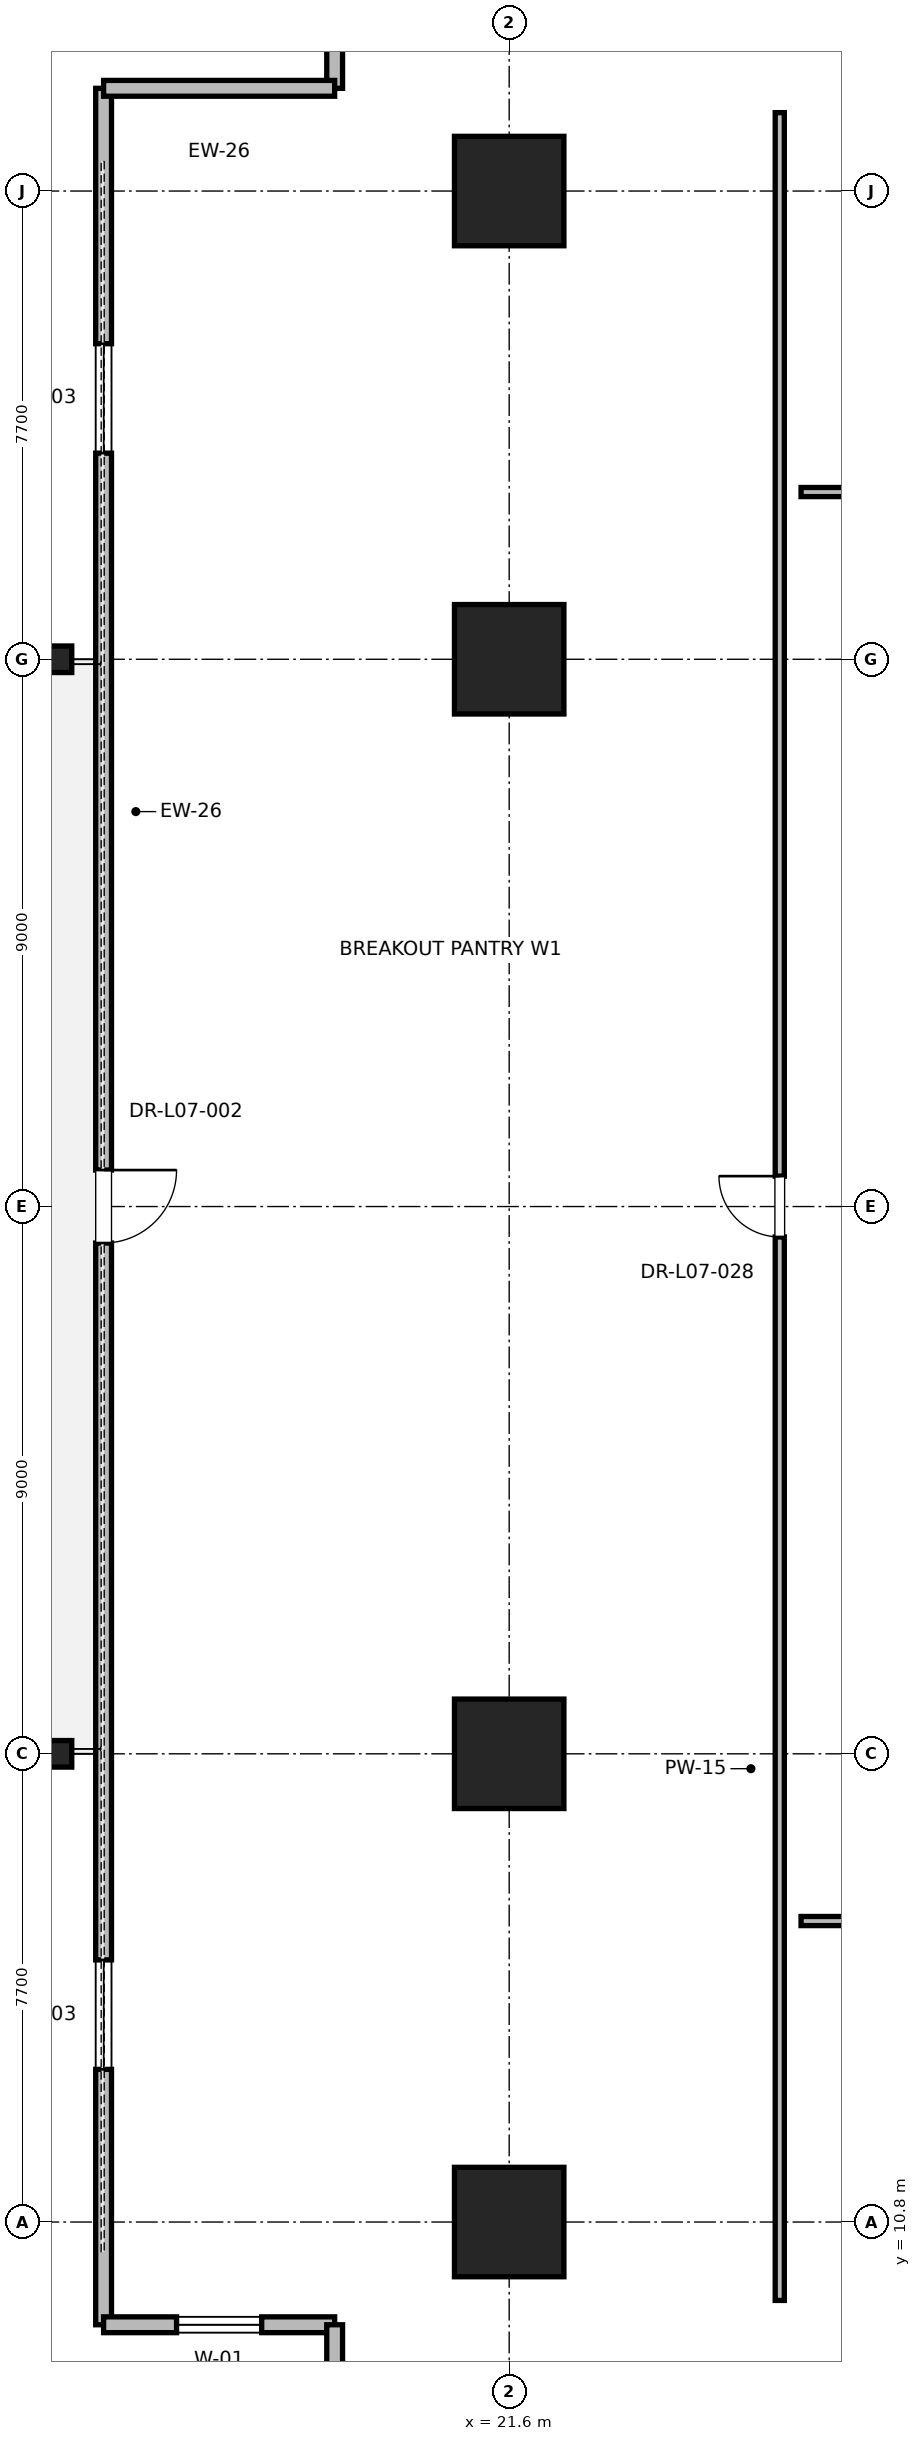
"""IFC4 building model, lengths in metres.
Left out: names, types, materials, properties, quantities, classifications, styles, units other than length and angle.
Written with IfcOpenShell. Run it as: python <this file> out.ifc"""

import sys

from ifc_helpers import new_model, si_unit, direction, frame, frame_2d, origin, origin_2d, place, context, subcontext, project, spatial, rectangle, i_section, extrude, element, fill, save


model = new_model("IFC4")
c1 = context("Model", 3, precision=1e-05, world=origin(), true_north=direction((0.0, 1.0)))
c2 = subcontext(c1, "Body", "Model", "MODEL_VIEW")
j1 = project(units=[si_unit("LENGTHUNIT", "METRE"), si_unit("PLANEANGLEUNIT", "RADIAN")], contexts=[c1])
p1 = place(None, origin())
s1 = spatial("IfcSite", under=j1, at=p1, CompositionType="ELEMENT")
p2 = place(p1, origin())
s2 = spatial("IfcBuilding", under=s1, at=p2, CompositionType="ELEMENT")
p3 = place(p2, frame((0.0, 0.0, 35.6)))
s3 = spatial("IfcBuildingStorey", under=s2, at=p3, CompositionType="ELEMENT", Elevation=35.6)
for number, where, z_axis, x_axis in (
    (1, (21.6, 18.5, 0.0), (0.0, 0.0, 1.0), (1.0, 0.0, 0.0)),
    (2, (21.6, 36.5, 0.0), (0.0, 0.0, 1.0), (1.0, 0.0, 0.0)),
    (3, (21.6, 10.8, 0.0), (0.0, 0.0, 1.0), (1.0, 0.0, 0.0)),
    (4, (21.6, 44.2, 0.0), (0.0, 0.0, 1.0), (1.0, 0.0, 0.0)),
):
    element("IfcColumn", number, at=place(p3, frame(where, z_axis=z_axis, x_axis=x_axis)), inside=s3, PredefinedType="COLUMN", context=c2, shape_type="SweptSolid", body=[
        extrude(rectangle(XDim=1.8, YDim=1.8, at=origin_2d()), origin(), (0.0, 0.0, 1.0), 4.0),
    ])
for number, where, z_axis, x_axis in (
    (5, (14.2, 18.5, 0.0), (0.0, 0.0, 1.0), (1.0, 0.0, 0.0)),
    (6, (14.2, 36.5, 0.0), (0.0, 0.0, 1.0), (1.0, 0.0, 0.0)),
):
    element("IfcColumn", number, at=place(p3, frame(where, z_axis=z_axis, x_axis=x_axis)), inside=s3, PredefinedType="COLUMN", context=c2, shape_type="SweptSolid", body=[
        extrude(i_section(OverallWidth=0.412, OverallDepth=0.437, WebThickness=0.036, FlangeThickness=0.058, FilletRadius=0.015, at=origin_2d()), origin(), (0.0, 0.0, 1.0), 4.0),
    ])
p4 = place(p3, frame((14.93, 45.889, 0.0), z_axis=(0.0, 0.0, 1.0), x_axis=(0.0, -1.0, 0.0)))
e7 = element("IfcWall", 7, at=p4, inside=s3, PredefinedType="PARAPET", context=c2, shape_type="SweptSolid", body=[
    extrude(rectangle(XDim=36.779, YDim=0.26, at=frame_2d((18.389, 0.0))), origin(), (0.0, 0.0, 1.0), 2.889),
])
p5 = place(p4, frame((4.2, 0.0, 0.85)))
e8 = element("IfcOpeningElement", 8, at=p5, cuts=e7, PredefinedType="OPENING", context=c2, shape_type="SweptSolid", body=[
    extrude(rectangle(XDim=1.8, YDim=2.2, at=frame_2d((0.9, 1.1))), frame((0.0, 0.13, 0.0), z_axis=(0.0, -1.0, 0.0), x_axis=(1.0, 0.0, 0.0)), (0.0, 0.0, 1.0), 0.26),
])
p6 = place(p4, frame((17.789, 0.0, 0.0)))
e9 = element("IfcOpeningElement", 9, at=p6, cuts=e7, PredefinedType="OPENING", context=c2, shape_type="SweptSolid", body=[
    extrude(rectangle(XDim=1.2, YDim=2.2, at=frame_2d((0.6, 1.1))), frame((0.0, 0.13, 0.0), z_axis=(0.0, -1.0, 0.0), x_axis=(1.0, 0.0, 0.0)), (0.0, 0.0, 1.0), 0.26),
])
p7 = place(p4, frame((30.779, 0.0, 0.85)))
e10 = element("IfcOpeningElement", 10, at=p7, cuts=e7, PredefinedType="OPENING", context=c2, shape_type="SweptSolid", body=[
    extrude(rectangle(XDim=1.8, YDim=2.2, at=frame_2d((0.9, 1.1))), frame((0.0, 0.13, 0.0), z_axis=(0.0, -1.0, 0.0), x_axis=(1.0, 0.0, 0.0)), (0.0, 0.0, 1.0), 0.26),
])
p8 = place(p3, frame((14.93, 9.111, 0.0), z_axis=(0.0, 0.0, 1.0), x_axis=(1.0, 0.0, 0.0)))
e11 = element("IfcWall", 11, at=p8, inside=s3, PredefinedType="PARAPET", context=c2, shape_type="SweptSolid", body=[
    extrude(rectangle(XDim=3.8, YDim=0.26, at=frame_2d((1.9, 0.0))), origin(), (0.0, 0.0, 1.0), 3.76),
])
p9 = place(p8, frame((1.2, 0.0, 0.85)))
e12 = element("IfcOpeningElement", 12, at=p9, cuts=e11, PredefinedType="OPENING", context=c2, shape_type="SweptSolid", body=[
    extrude(rectangle(XDim=1.4, YDim=2.0, at=frame_2d((0.7, 1.0))), frame((0.0, 0.13, 0.0), z_axis=(0.0, -1.0, 0.0), x_axis=(1.0, 0.0, 0.0)), (0.0, 0.0, 1.0), 0.26),
])
p10 = place(p3, frame((18.729, 9.111, 0.0), z_axis=(0.0, 0.0, 1.0), x_axis=(0.0, -1.0, 0.0)))
e13 = element("IfcWall", 13, at=p10, inside=s3, PredefinedType="PARAPET", context=c2, shape_type="SweptSolid", body=[
    extrude(rectangle(XDim=3.4, YDim=0.26, at=frame_2d((1.7, 0.0))), origin(), (0.0, 0.0, 1.0), 3.76),
])
p11 = place(p3, frame((18.729, 49.289, 0.0), z_axis=(0.0, 0.0, 1.0), x_axis=(0.0, -1.0, 0.0)))
e14 = element("IfcWall", 14, at=p11, inside=s3, PredefinedType="PARAPET", context=c2, shape_type="SweptSolid", body=[
    extrude(rectangle(XDim=3.4, YDim=0.26, at=frame_2d((1.7, 0.0))), origin(), (0.0, 0.0, 1.0), 3.76),
])
p12 = place(p11, frame((1.0, 0.0, 0.85)))
e15 = element("IfcOpeningElement", 15, at=p12, cuts=e14, PredefinedType="OPENING", context=c2, shape_type="SweptSolid", body=[
    extrude(rectangle(XDim=1.4, YDim=2.0, at=frame_2d((0.7, 1.0))), frame((0.0, 0.13, 0.0), z_axis=(0.0, -1.0, 0.0), x_axis=(1.0, 0.0, 0.0)), (0.0, 0.0, 1.0), 0.26),
])
p13 = place(p3, frame((18.729, 45.889, 0.0), z_axis=(0.0, 0.0, 1.0), x_axis=(-1.0, 0.0, 0.0)))
e16 = element("IfcWall", 16, at=p13, inside=s3, PredefinedType="PARAPET", context=c2, shape_type="SweptSolid", body=[
    extrude(rectangle(XDim=3.8, YDim=0.26, at=frame_2d((1.9, 0.0))), origin(), (0.0, 0.0, 1.0), 3.76),
])
p14 = place(p3, frame((26.4, 39.25, 0.0), z_axis=(0.0, 0.0, 1.0), x_axis=(1.0, 0.0, 0.0)))
e17 = element("IfcWall", 17, at=p14, inside=s3, PredefinedType="PARTITIONING", context=c2, shape_type="SweptSolid", body=[
    extrude(rectangle(XDim=12.512, YDim=0.15, at=frame_2d((6.256, 0.0))), origin(), (0.0, 0.0, 1.0), 2.85),
])
p15 = place(p14, frame((5.771, 0.0, 0.0)))
e18 = element("IfcOpeningElement", 18, at=p15, cuts=e17, PredefinedType="OPENING", context=c2, shape_type="SweptSolid", body=[
    extrude(rectangle(XDim=1.0, YDim=2.15, at=frame_2d((0.5, 1.075))), frame((0.0, 0.075, 0.0), z_axis=(0.0, -1.0, 0.0), x_axis=(1.0, 0.0, 0.0)), (0.0, 0.0, 1.0), 0.15),
])
p16 = place(p3, frame((26.4, 15.75, 0.0), z_axis=(0.0, 0.0, 1.0), x_axis=(1.0, 0.0, 0.0)))
e19 = element("IfcWall", 19, at=p16, inside=s3, PredefinedType="PARTITIONING", context=c2, shape_type="SweptSolid", body=[
    extrude(rectangle(XDim=8.704, YDim=0.15, at=frame_2d((4.352, 0.0))), origin(), (0.0, 0.0, 1.0), 2.85),
])
p17 = place(p16, frame((3.617, 0.0, 0.0)))
e20 = element("IfcOpeningElement", 20, at=p17, cuts=e19, PredefinedType="OPENING", context=c2, shape_type="SweptSolid", body=[
    extrude(rectangle(XDim=1.5, YDim=2.25, at=frame_2d((0.75, 1.125))), frame((0.0, 0.075, 0.0), z_axis=(0.0, -1.0, 0.0), x_axis=(1.0, 0.0, 0.0)), (0.0, 0.0, 1.0), 0.15),
])
p18 = place(p3, frame((26.05, 9.511, 0.0), z_axis=(0.0, 0.0, 1.0), x_axis=(0.0, 1.0, 0.0)))
e21 = element("IfcWall", 21, at=p18, inside=s3, PredefinedType="PARTITIONING", context=c2, shape_type="SweptSolid", body=[
    extrude(rectangle(XDim=35.979, YDim=0.15, at=frame_2d((17.989, 0.0))), origin(), (0.0, 0.0, 1.0), 2.85),
])
p19 = place(p18, frame((17.489, 0.0, 0.0)))
e22 = element("IfcOpeningElement", 22, at=p19, cuts=e21, PredefinedType="OPENING", context=c2, shape_type="SweptSolid", body=[
    extrude(rectangle(XDim=1.0, YDim=2.15, at=frame_2d((0.5, 1.075))), frame((0.0, 0.075, 0.0), z_axis=(0.0, -1.0, 0.0), x_axis=(1.0, 0.0, 0.0)), (0.0, 0.0, 1.0), 0.15),
])
p20 = place(p5, origin())
e23 = element("IfcWindow", 23, at=p20, inside=s3, PartitioningType="SINGLE_PANEL", PredefinedType="WINDOW", context=c2, shape_type="SweptSolid", body=[
    extrude(rectangle(XDim=1.8, YDim=2.2, at=frame_2d((0.9, 1.1))), frame((0.0, 0.03, 0.0), z_axis=(0.0, -1.0, 0.0), x_axis=(1.0, 0.0, 0.0)), (0.0, 0.0, 1.0), 0.06),
])
fill(e8, e23)
p21 = place(p6, origin())
e24 = element("IfcDoor", 24, at=p21, inside=s3, OperationType="SINGLE_SWING_LEFT", PredefinedType="DOOR", context=c2, shape_type="SweptSolid", body=[
    extrude(rectangle(XDim=1.2, YDim=2.2, at=frame_2d((0.6, 1.1))), frame((0.0, 0.025, 0.0), z_axis=(0.0, -1.0, 0.0), x_axis=(1.0, 0.0, 0.0)), (0.0, 0.0, 1.0), 0.05),
])
fill(e9, e24)
p22 = place(p7, origin())
e25 = element("IfcWindow", 25, at=p22, inside=s3, PartitioningType="SINGLE_PANEL", PredefinedType="WINDOW", context=c2, shape_type="SweptSolid", body=[
    extrude(rectangle(XDim=1.8, YDim=2.2, at=frame_2d((0.9, 1.1))), frame((0.0, 0.03, 0.0), z_axis=(0.0, -1.0, 0.0), x_axis=(1.0, 0.0, 0.0)), (0.0, 0.0, 1.0), 0.06),
])
fill(e10, e25)
p23 = place(p9, origin())
e26 = element("IfcWindow", 26, at=p23, inside=s3, PartitioningType="SINGLE_PANEL", PredefinedType="WINDOW", context=c2, shape_type="SweptSolid", body=[
    extrude(rectangle(XDim=1.4, YDim=2.0, at=frame_2d((0.7, 1.0))), frame((0.0, 0.03, 0.0), z_axis=(0.0, -1.0, 0.0), x_axis=(1.0, 0.0, 0.0)), (0.0, 0.0, 1.0), 0.06),
])
fill(e12, e26)
p24 = place(p19, origin())
e27 = element("IfcDoor", 27, at=p24, inside=s3, OperationType="SINGLE_SWING_RIGHT", PredefinedType="DOOR", context=c2, shape_type="SweptSolid", body=[
    extrude(rectangle(XDim=1.0, YDim=2.15, at=frame_2d((0.5, 1.075))), frame((0.0, 0.025, 0.0), z_axis=(0.0, -1.0, 0.0), x_axis=(1.0, 0.0, 0.0)), (0.0, 0.0, 1.0), 0.05),
])
fill(e22, e27)
save(model, sys.argv[1])
